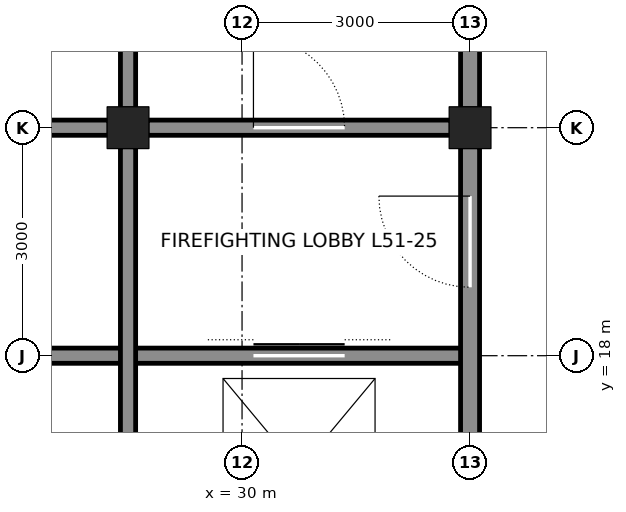
"""IFC4 building model, lengths in metres.
Left out: names, types, materials, properties, quantities, classifications, styles, units other than length and angle.
Written with IfcOpenShell. Run it as: python <this file> out.ifc"""

import sys

from ifc_helpers import new_model, si_unit, direction, frame, frame_2d, origin, origin_2d, place, context, subcontext, project, spatial, rectangle, hollow_rectangle, extrude, element, fill, save


model = new_model("IFC4")
c1 = context("Model", 3, precision=1e-05, world=origin(), true_north=direction((0.0, 1.0)))
c2 = subcontext(c1, "Body", "Model", "MODEL_VIEW")
j1 = project(units=[si_unit("LENGTHUNIT", "METRE"), si_unit("PLANEANGLEUNIT", "RADIAN")], contexts=[c1])
p1 = place(None, origin())
s1 = spatial("IfcSite", under=j1, at=p1, CompositionType="ELEMENT")
p2 = place(p1, origin())
s2 = spatial("IfcBuilding", under=s1, at=p2, CompositionType="ELEMENT")
p3 = place(p2, frame((0.0, 0.0, 230.7)))
s3 = spatial("IfcBuildingStorey", under=s2, at=p3, CompositionType="ELEMENT", Elevation=230.7)
for number, where, z_axis, x_axis in (
    (1, (33.0, 21.0, 0.0), (0.0, 0.0, 1.0), (1.0, 0.0, 0.0)),
    (2, (28.5, 21.0, 0.0), (0.0, 0.0, 1.0), (1.0, 0.0, 0.0)),
):
    element("IfcColumn", number, at=place(p3, frame(where, z_axis=z_axis, x_axis=x_axis)), inside=s3, PredefinedType="COLUMN", context=c2, shape_type="SweptSolid", body=[
        extrude(hollow_rectangle(XDim=0.55, YDim=0.55, WallThickness=0.045, at=origin_2d()), origin(), (0.0, 0.0, 1.0), 4.2),
    ])
p4 = place(p3, frame((25.5, 18.0, 0.0), z_axis=(0.0, 0.0, 1.0), x_axis=(1.0, 0.0, 0.0)))
e3 = element("IfcWall", 3, at=p4, inside=s3, PredefinedType="SOLIDWALL", context=c2, shape_type="SweptSolid", body=[
    extrude(rectangle(XDim=7.5, YDim=0.2, at=frame_2d((3.75, 0.0))), origin(), (0.0, 0.0, 1.0), 4.04),
])
p5 = place(p4, frame((4.65, 0.0, 0.0)))
e4 = element("IfcOpeningElement", 4, at=p5, cuts=e3, PredefinedType="OPENING", context=c2, shape_type="SweptSolid", body=[
    extrude(rectangle(XDim=1.2, YDim=2.1, at=frame_2d((0.6, 1.05))), frame((0.0, 0.11, 0.0), z_axis=(0.0, -1.0, 0.0), x_axis=(1.0, 0.0, 0.0)), (0.0, 0.0, 1.0), 0.22),
])
p6 = place(p3, frame((25.5, 21.0, 0.0), z_axis=(0.0, 0.0, 1.0), x_axis=(1.0, 0.0, 0.0)))
e5 = element("IfcWall", 5, at=p6, inside=s3, PredefinedType="SOLIDWALL", context=c2, shape_type="SweptSolid", body=[
    extrude(rectangle(XDim=2.75, YDim=0.2, at=frame_2d((1.375, 0.0))), origin(), (0.0, 0.0, 1.0), 3.09),
])
p7 = place(p3, frame((28.75, 21.0, 0.0), z_axis=(0.0, 0.0, 1.0), x_axis=(1.0, 0.0, 0.0)))
e6 = element("IfcWall", 6, at=p7, inside=s3, PredefinedType="SOLIDWALL", context=c2, shape_type="SweptSolid", body=[
    extrude(rectangle(XDim=4.0, YDim=0.2, at=frame_2d((2.0, 0.0))), origin(), (0.0, 0.0, 1.0), 3.09),
])
p8 = place(p7, frame((1.4, 0.0, 0.0)))
e7 = element("IfcOpeningElement", 7, at=p8, cuts=e6, PredefinedType="OPENING", context=c2, shape_type="SweptSolid", body=[
    extrude(rectangle(XDim=1.2, YDim=2.1, at=frame_2d((0.6, 1.05))), frame((0.0, 0.11, 0.0), z_axis=(0.0, -1.0, 0.0), x_axis=(1.0, 0.0, 0.0)), (0.0, 0.0, 1.0), 0.22),
])
p9 = place(p3, frame((28.5, 12.25, 0.0), z_axis=(0.0, 0.0, 1.0), x_axis=(0.0, 1.0, 0.0)))
e8 = element("IfcWall", 8, at=p9, inside=s3, PredefinedType="SOLIDWALL", context=c2, shape_type="SweptSolid", body=[
    extrude(rectangle(XDim=8.5, YDim=0.2, at=frame_2d((4.25, 0.0))), origin(), (0.0, 0.0, 1.0), 3.113),
])
p10 = place(p3, frame((28.5, 21.25, 0.0), z_axis=(0.0, 0.0, 1.0), x_axis=(0.0, 1.0, 0.0)))
e9 = element("IfcWall", 9, at=p10, inside=s3, PredefinedType="SOLIDWALL", context=c2, shape_type="SweptSolid", body=[
    extrude(rectangle(XDim=2.5, YDim=0.2, at=frame_2d((1.25, 0.0))), origin(), (0.0, 0.0, 1.0), 3.113),
])
p11 = place(p3, frame((33.0, 12.25, 0.0), z_axis=(0.0, 0.0, 1.0), x_axis=(0.0, 1.0, 0.0)))
e10 = element("IfcWall", 10, at=p11, inside=s3, PredefinedType="SOLIDWALL", context=c2, shape_type="SweptSolid", body=[
    extrude(rectangle(XDim=8.5, YDim=0.25, at=frame_2d((4.25, 0.0))), origin(), (0.0, 0.0, 1.0), 3.113),
])
p12 = place(p11, frame((6.65, 0.0, 0.0)))
e11 = element("IfcOpeningElement", 11, at=p12, cuts=e10, PredefinedType="OPENING", context=c2, shape_type="SweptSolid", body=[
    extrude(rectangle(XDim=1.2, YDim=2.1, at=frame_2d((0.6, 1.05))), frame((0.0, 0.135, 0.0), z_axis=(0.0, -1.0, 0.0), x_axis=(1.0, 0.0, 0.0)), (0.0, 0.0, 1.0), 0.27),
])
p13 = place(p11, frame((0.875, 0.0, 0.0)))
e12 = element("IfcOpeningElement", 12, at=p13, cuts=e10, PredefinedType="OPENING", context=c2, shape_type="SweptSolid", body=[
    extrude(rectangle(XDim=0.75, YDim=2.1, at=frame_2d((0.375, 1.05))), frame((0.0, 0.135, 0.0), z_axis=(0.0, -1.0, 0.0), x_axis=(1.0, 0.0, 0.0)), (0.0, 0.0, 1.0), 0.27),
])
p14 = place(p3, frame((33.0, 21.25, 0.0), z_axis=(0.0, 0.0, 1.0), x_axis=(0.0, 1.0, 0.0)))
e13 = element("IfcWall", 13, at=p14, inside=s3, PredefinedType="SOLIDWALL", context=c2, shape_type="SweptSolid", body=[
    extrude(rectangle(XDim=2.5, YDim=0.25, at=frame_2d((1.25, 0.0))), origin(), (0.0, 0.0, 1.0), 3.113),
])
p15 = place(p8, origin())
e14 = element("IfcDoor", 14, at=p15, inside=s3, OperationType="SINGLE_SWING_LEFT", PredefinedType="DOOR", context=c2, shape_type="SweptSolid", body=[
    extrude(rectangle(XDim=1.2, YDim=2.1, at=frame_2d((0.6, 1.05))), frame((0.0, 0.025, 0.0), z_axis=(0.0, -1.0, 0.0), x_axis=(1.0, 0.0, 0.0)), (0.0, 0.0, 1.0), 0.05),
])
fill(e7, e14)
p16 = place(p12, origin())
e15 = element("IfcDoor", 15, at=p16, inside=s3, OperationType="SINGLE_SWING_RIGHT", PredefinedType="DOOR", context=c2, shape_type="SweptSolid", body=[
    extrude(rectangle(XDim=1.2, YDim=2.1, at=frame_2d((0.6, 1.05))), frame((0.0, 0.025, 0.0), z_axis=(0.0, -1.0, 0.0), x_axis=(1.0, 0.0, 0.0)), (0.0, 0.0, 1.0), 0.05),
])
fill(e11, e15)
p17 = place(p5, origin())
e16 = element("IfcDoor", 16, at=p17, inside=s3, OperationType="DOUBLE_DOOR_SLIDING", PredefinedType="DOOR", context=c2, shape_type="SweptSolid", body=[
    extrude(rectangle(XDim=1.2, YDim=2.1, at=frame_2d((0.6, 1.05))), frame((0.0, 0.025, 0.0), z_axis=(0.0, -1.0, 0.0), x_axis=(1.0, 0.0, 0.0)), (0.0, 0.0, 1.0), 0.05),
])
fill(e4, e16)
save(model, sys.argv[1])
